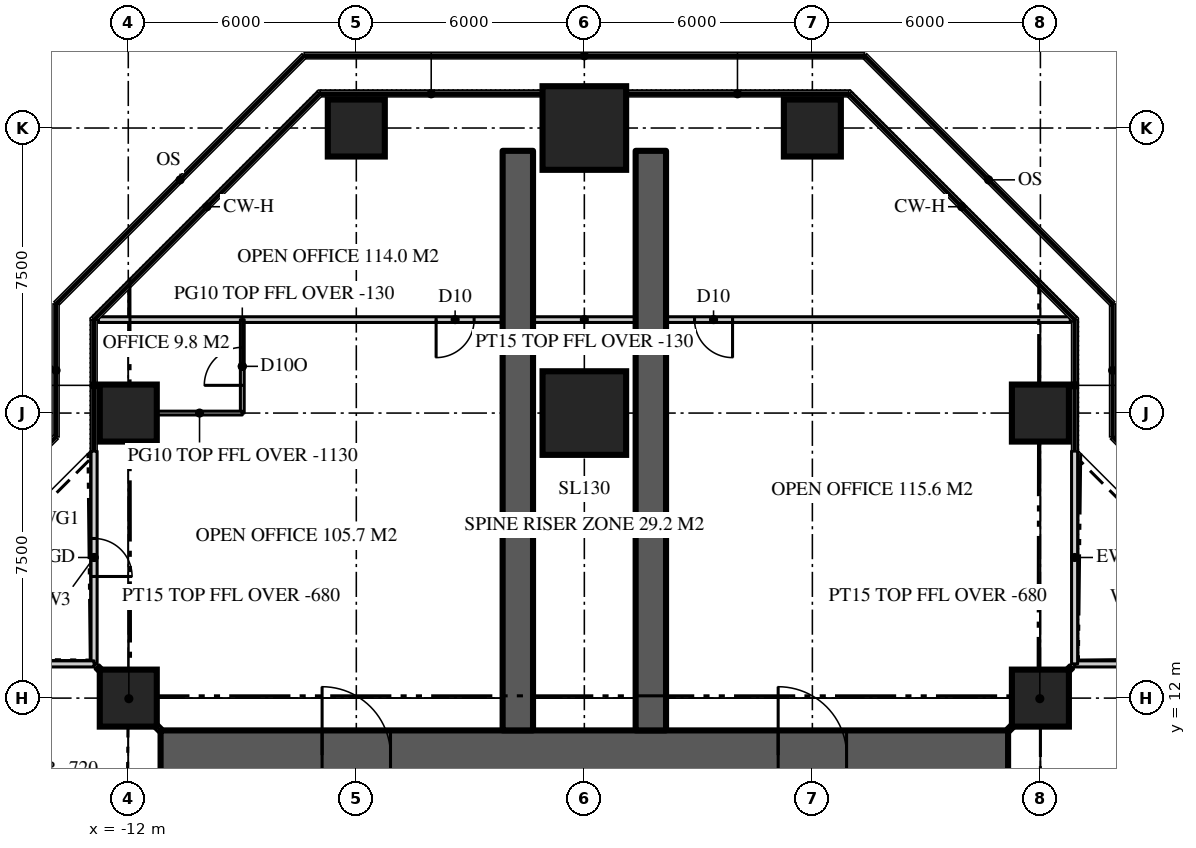
"""IFC4 building model, lengths in metres.
Left out: names, types, materials, properties, quantities, classifications, styles, units other than length and angle.
Written with IfcOpenShell. Run it as: python <this file> out.ifc"""

import sys

from ifc_helpers import new_model, si_unit, direction, frame, frame_2d, origin, origin_2d, place, context, subcontext, project, spatial, rectangle, extrude, element, fill, save


model = new_model("IFC4")
c1 = context("Model", 3, precision=1e-05, world=origin(), true_north=direction((0.0, 1.0)))
c2 = subcontext(c1, "Body", "Model", "MODEL_VIEW")
j1 = project(units=[si_unit("LENGTHUNIT", "METRE"), si_unit("PLANEANGLEUNIT", "RADIAN")], contexts=[c1])
p1 = place(None, origin())
s1 = spatial("IfcSite", under=j1, at=p1, CompositionType="ELEMENT")
p2 = place(p1, origin())
s2 = spatial("IfcBuilding", under=s1, at=p2, CompositionType="ELEMENT")
p3 = place(p2, frame((0.0, 0.0, 259.5)))
s3 = spatial("IfcBuildingStorey", under=s2, at=p3, CompositionType="ELEMENT", Elevation=259.5)
p4 = place(p3, frame((-11.15, 10.5, 0.0), z_axis=(0.0, 0.0, 1.0), x_axis=(1.0, 0.0, 0.0)))
e1 = element("IfcWall", 1, at=p4, inside=s3, PredefinedType="SHEAR", context=c2, shape_type="SweptSolid", body=[
    extrude(rectangle(XDim=22.3, YDim=1.3, at=frame_2d((11.15, 0.0))), origin(), (0.0, 0.0, 1.0), 3.9),
])
p5 = place(p4, frame((4.25, 0.0, 0.0)))
e2 = element("IfcOpeningElement", 2, at=p5, cuts=e1, PredefinedType="OPENING", context=c2, shape_type="SweptSolid", body=[
    extrude(rectangle(XDim=1.8, YDim=2.2, at=frame_2d((0.9, 1.1))), frame((0.0, 0.66, 0.0), z_axis=(0.0, -1.0, 0.0), x_axis=(1.0, 0.0, 0.0)), (0.0, 0.0, 1.0), 1.32),
])
p6 = place(p4, frame((16.25, 0.0, 0.0)))
e3 = element("IfcOpeningElement", 3, at=p6, cuts=e1, PredefinedType="OPENING", context=c2, shape_type="SweptSolid", body=[
    extrude(rectangle(XDim=1.8, YDim=2.2, at=frame_2d((0.9, 1.1))), frame((0.0, 0.66, 0.0), z_axis=(0.0, -1.0, 0.0), x_axis=(1.0, 0.0, 0.0)), (0.0, 0.0, 1.0), 1.32),
])
for number, where, z_axis, x_axis in (
    (4, (1.75, 11.15, 0.0), (0.0, 0.0, 1.0), (0.0, 1.0, 0.0)),
    (5, (-1.75, 11.15, 0.0), (0.0, 0.0, 1.0), (0.0, 1.0, 0.0)),
):
    element("IfcWall", number, at=place(p3, frame(where, z_axis=z_axis, x_axis=x_axis)), inside=s3, PredefinedType="SHEAR", context=c2, shape_type="SweptSolid", body=[
        extrude(rectangle(XDim=15.25, YDim=0.8, at=frame_2d((7.625, 0.0))), origin(), (0.0, 0.0, 1.0), 3.9),
    ])
for number, where, z_axis, x_axis in (
    (6, (-12.0, 12.0, 0.0), (0.0, 0.0, 1.0), (1.0, 0.0, 0.0)),
    (7, (12.0, 12.0, 0.0), (0.0, 0.0, 1.0), (1.0, 0.0, 0.0)),
    (8, (-12.0, 19.5, 0.0), (0.0, 0.0, 1.0), (1.0, 0.0, 0.0)),
):
    element("IfcColumn", number, at=place(p3, frame(where, z_axis=z_axis, x_axis=x_axis)), inside=s3, PredefinedType="COLUMN", context=c2, shape_type="SweptSolid", body=[
        extrude(rectangle(XDim=1.5, YDim=1.5, at=origin_2d()), origin(), (0.0, 0.0, 1.0), 3.9),
    ])
p7 = place(p3, frame((0.0, 19.5, 0.0), z_axis=(0.0, 0.0, 1.0), x_axis=(1.0, 0.0, 0.0)))
e9 = element("IfcColumn", 9, at=p7, inside=s3, PredefinedType="COLUMN", context=c2, shape_type="SweptSolid", body=[
    extrude(rectangle(XDim=2.2, YDim=2.2, at=origin_2d()), origin(), (0.0, 0.0, 1.0), 3.9),
])
for number, where, z_axis, x_axis in (
    (10, (12.0, 19.5, 0.0), (0.0, 0.0, 1.0), (1.0, 0.0, 0.0)),
    (11, (-6.0, 27.0, 0.0), (0.0, 0.0, 1.0), (1.0, 0.0, 0.0)),
):
    element("IfcColumn", number, at=place(p3, frame(where, z_axis=z_axis, x_axis=x_axis)), inside=s3, PredefinedType="COLUMN", context=c2, shape_type="SweptSolid", body=[
        extrude(rectangle(XDim=1.5, YDim=1.5, at=origin_2d()), origin(), (0.0, 0.0, 1.0), 3.9),
    ])
p8 = place(p3, frame((0.0, 27.0, 0.0), z_axis=(0.0, 0.0, 1.0), x_axis=(1.0, 0.0, 0.0)))
e12 = element("IfcColumn", 12, at=p8, inside=s3, PredefinedType="COLUMN", context=c2, shape_type="SweptSolid", body=[
    extrude(rectangle(XDim=2.2, YDim=2.2, at=origin_2d()), origin(), (0.0, 0.0, 1.0), 3.9),
])
p9 = place(p3, frame((6.0, 27.0, 0.0), z_axis=(0.0, 0.0, 1.0), x_axis=(1.0, 0.0, 0.0)))
e13 = element("IfcColumn", 13, at=p9, inside=s3, PredefinedType="COLUMN", context=c2, shape_type="SweptSolid", body=[
    extrude(rectangle(XDim=1.5, YDim=1.5, at=origin_2d()), origin(), (0.0, 0.0, 1.0), 3.9),
])
p10 = place(p3, frame((18.5, 12.9, 0.0), z_axis=(0.0, 0.0, 1.0), x_axis=(-1.0, 0.0, 0.0)))
e14 = element("IfcWall", 14, at=p10, inside=s3, PredefinedType="SOLIDWALL", context=c2, shape_type="SweptSolid", body=[
    extrude(rectangle(XDim=5.6, YDim=0.16, at=frame_2d((2.8, 0.0))), origin(), (0.0, 0.0, 1.0), 3.77),
])
p11 = place(p10, frame((2.3, 0.0, 0.0)))
e15 = element("IfcOpeningElement", 15, at=p11, cuts=e14, PredefinedType="OPENING", context=c2, shape_type="SweptSolid", body=[
    extrude(rectangle(XDim=1.0, YDim=2.2, at=frame_2d((0.5, 1.1))), frame((0.0, 0.09, 0.0), z_axis=(0.0, -1.0, 0.0), x_axis=(1.0, 0.0, 0.0)), (0.0, 0.0, 1.0), 0.18),
])
p12 = place(p3, frame((12.9, 12.9, 0.0), z_axis=(0.0, 0.0, 1.0), x_axis=(0.0, 1.0, 0.0)))
e16 = element("IfcWall", 16, at=p12, inside=s3, PredefinedType="SOLIDWALL", context=c2, shape_type="SweptSolid", body=[
    extrude(rectangle(XDim=5.6, YDim=0.16, at=frame_2d((2.8, 0.0))), origin(), (0.0, 0.0, 1.0), 3.77),
])
p13 = place(p3, frame((-12.9, 18.5, 0.0), z_axis=(0.0, 0.0, 1.0), x_axis=(0.0, -1.0, 0.0)))
e17 = element("IfcWall", 17, at=p13, inside=s3, PredefinedType="SOLIDWALL", context=c2, shape_type="SweptSolid", body=[
    extrude(rectangle(XDim=5.6, YDim=0.16, at=frame_2d((2.8, 0.0))), origin(), (0.0, 0.0, 1.0), 3.77),
])
p14 = place(p13, frame((2.3, 0.0, 0.0)))
e18 = element("IfcOpeningElement", 18, at=p14, cuts=e17, PredefinedType="OPENING", context=c2, shape_type="SweptSolid", body=[
    extrude(rectangle(XDim=1.0, YDim=2.2, at=frame_2d((0.5, 1.1))), frame((0.0, 0.09, 0.0), z_axis=(0.0, -1.0, 0.0), x_axis=(1.0, 0.0, 0.0)), (0.0, 0.0, 1.0), 0.18),
])
p15 = place(p3, frame((-12.9, 12.9, 0.0), z_axis=(0.0, 0.0, 1.0), x_axis=(-1.0, 0.0, 0.0)))
e19 = element("IfcWall", 19, at=p15, inside=s3, PredefinedType="SOLIDWALL", context=c2, shape_type="SweptSolid", body=[
    extrude(rectangle(XDim=5.6, YDim=0.16, at=frame_2d((2.8, 0.0))), origin(), (0.0, 0.0, 1.0), 3.77),
])
p16 = place(p3, frame((12.786, 21.959, 0.0), z_axis=(0.0, 0.0, 1.0), x_axis=(-1.0, 0.0, 0.0)))
e20 = element("IfcWall", 20, at=p16, inside=s3, PredefinedType="PARTITIONING", context=c2, shape_type="SweptSolid", body=[
    extrude(rectangle(XDim=25.573, YDim=0.15, at=frame_2d((12.786, 0.0))), origin(), (0.0, 0.0, 1.0), 3.77),
])
p17 = place(p16, frame((15.687, 0.0, 0.0)))
e21 = element("IfcOpeningElement", 21, at=p17, cuts=e20, PredefinedType="OPENING", context=c2, shape_type="SweptSolid", body=[
    extrude(rectangle(XDim=1.0, YDim=2.2, at=frame_2d((0.5, 1.1))), frame((0.0, 0.085, 0.0), z_axis=(0.0, -1.0, 0.0), x_axis=(1.0, 0.0, 0.0)), (0.0, 0.0, 1.0), 0.17),
])
p18 = place(p16, frame((8.886, 0.0, 0.0)))
e22 = element("IfcOpeningElement", 22, at=p18, cuts=e20, PredefinedType="OPENING", context=c2, shape_type="SweptSolid", body=[
    extrude(rectangle(XDim=1.0, YDim=2.2, at=frame_2d((0.5, 1.1))), frame((0.0, 0.085, 0.0), z_axis=(0.0, -1.0, 0.0), x_axis=(1.0, 0.0, 0.0)), (0.0, 0.0, 1.0), 0.17),
])
p19 = place(p3, frame((-9.0, 19.5, 0.0), z_axis=(0.0, 0.0, 1.0), x_axis=(0.0, 1.0, 0.0)))
e23 = element("IfcWall", 23, at=p19, inside=s3, PredefinedType="PARTITIONING", context=c2, shape_type="SweptSolid", body=[
    extrude(rectangle(XDim=2.459, YDim=0.1, at=frame_2d((1.229, 0.0))), origin(), (0.0, 0.0, 1.0), 3.77),
])
p20 = place(p19, frame((0.729, 0.0, 0.0)))
e24 = element("IfcOpeningElement", 24, at=p20, cuts=e23, PredefinedType="OPENING", context=c2, shape_type="SweptSolid", body=[
    extrude(rectangle(XDim=1.0, YDim=2.2, at=frame_2d((0.5, 1.1))), frame((0.0, 0.06, 0.0), z_axis=(0.0, -1.0, 0.0), x_axis=(1.0, 0.0, 0.0)), (0.0, 0.0, 1.0), 0.12),
])
p21 = place(p3, frame((-9.0, 19.5, 0.0), z_axis=(0.0, 0.0, 1.0), x_axis=(-1.0, 0.0, 0.0)))
e25 = element("IfcWall", 25, at=p21, inside=s3, PredefinedType="PARTITIONING", context=c2, shape_type="SweptSolid", body=[
    extrude(rectangle(XDim=2.25, YDim=0.1, at=frame_2d((1.125, 0.0))), origin(), (0.0, 0.0, 1.0), 2.77),
])
for number, where, z_axis, x_axis in (
    (26, (11.15, 11.15, 0.0), (0.0, 0.0, 1.0), (0.707, 0.707, 0.0)),
    (27, (-11.15, 11.15, 0.0), (0.0, 0.0, 1.0), (-0.707, 0.707, 0.0)),
):
    element("IfcWall", number, at=place(p3, frame(where, z_axis=z_axis, x_axis=x_axis)), inside=s3, PredefinedType="PARTITIONING", context=c2, shape_type="SweptSolid", body=[
        extrude(rectangle(XDim=2.362, YDim=0.15, at=frame_2d((1.181, 0.0))), origin(), (0.0, 0.0, 1.0), 3.22),
    ])
p22 = place(p14, origin())
e28 = element("IfcDoor", 28, at=p22, inside=s3, OperationType="SINGLE_SWING_RIGHT", PredefinedType="DOOR", context=c2, shape_type="SweptSolid", body=[
    extrude(rectangle(XDim=1.0, YDim=2.2, at=frame_2d((0.5, 1.1))), frame((0.0, 0.025, 0.0), z_axis=(0.0, -1.0, 0.0), x_axis=(1.0, 0.0, 0.0)), (0.0, 0.0, 1.0), 0.05),
])
fill(e18, e28)
p23 = place(p5, origin())
e29 = element("IfcDoor", 29, at=p23, inside=s3, OperationType="DOUBLE_DOOR_DOUBLE_SWING", PredefinedType="DOOR", context=c2, shape_type="SweptSolid", body=[
    extrude(rectangle(XDim=1.8, YDim=2.2, at=frame_2d((0.9, 1.1))), frame((0.0, 0.025, 0.0), z_axis=(0.0, -1.0, 0.0), x_axis=(1.0, 0.0, 0.0)), (0.0, 0.0, 1.0), 0.05),
])
fill(e2, e29)
p24 = place(p6, origin())
e30 = element("IfcDoor", 30, at=p24, inside=s3, OperationType="DOUBLE_DOOR_DOUBLE_SWING", PredefinedType="DOOR", context=c2, shape_type="SweptSolid", body=[
    extrude(rectangle(XDim=1.8, YDim=2.2, at=frame_2d((0.9, 1.1))), frame((0.0, 0.025, 0.0), z_axis=(0.0, -1.0, 0.0), x_axis=(1.0, 0.0, 0.0)), (0.0, 0.0, 1.0), 0.05),
])
fill(e3, e30)
p25 = place(p17, origin())
e31 = element("IfcDoor", 31, at=p25, inside=s3, OperationType="SINGLE_SWING_RIGHT", PredefinedType="DOOR", context=c2, shape_type="SweptSolid", body=[
    extrude(rectangle(XDim=1.0, YDim=2.2, at=frame_2d((0.5, 1.1))), frame((0.0, 0.025, 0.0), z_axis=(0.0, -1.0, 0.0), x_axis=(1.0, 0.0, 0.0)), (0.0, 0.0, 1.0), 0.05),
])
fill(e21, e31)
p26 = place(p18, origin())
e32 = element("IfcDoor", 32, at=p26, inside=s3, OperationType="SINGLE_SWING_LEFT", PredefinedType="DOOR", context=c2, shape_type="SweptSolid", body=[
    extrude(rectangle(XDim=1.0, YDim=2.2, at=frame_2d((0.5, 1.1))), frame((0.0, 0.025, 0.0), z_axis=(0.0, -1.0, 0.0), x_axis=(1.0, 0.0, 0.0)), (0.0, 0.0, 1.0), 0.05),
])
fill(e22, e32)
p27 = place(p20, origin())
e33 = element("IfcDoor", 33, at=p27, inside=s3, OperationType="SINGLE_SWING_LEFT", PredefinedType="DOOR", context=c2, shape_type="SweptSolid", body=[
    extrude(rectangle(XDim=1.0, YDim=2.2, at=frame_2d((0.5, 1.1))), frame((0.0, 0.025, 0.0), z_axis=(0.0, -1.0, 0.0), x_axis=(1.0, 0.0, 0.0)), (0.0, 0.0, 1.0), 0.05),
])
fill(e24, e33)
save(model, sys.argv[1])
